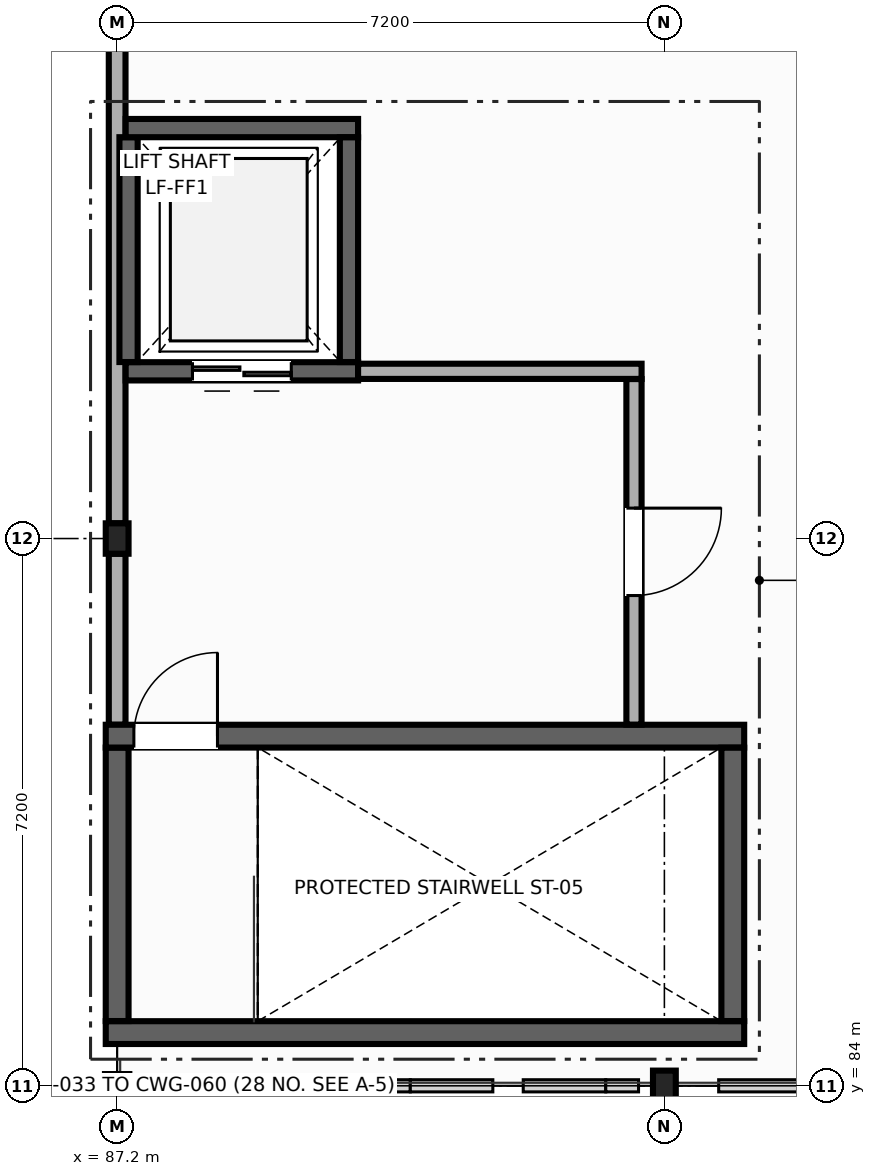
"""IFC4 building model, lengths in metres.
Left out: names, types, materials, properties, quantities, classifications, styles, units other than length and angle.
Written with IfcOpenShell. Run it as: python <this file> out.ifc"""

import sys

from ifc_helpers import new_model, si_unit, direction, frame, frame_2d, origin, origin_2d, place, context, subcontext, project, spatial, rectangle, i_section, extrude, element, fill, save


model = new_model("IFC4")
c1 = context("Model", 3, precision=1e-05, world=origin(), true_north=direction((0.0, 1.0)))
c2 = subcontext(c1, "Body", "Model", "MODEL_VIEW")
j1 = project(units=[si_unit("LENGTHUNIT", "METRE"), si_unit("PLANEANGLEUNIT", "RADIAN")], contexts=[c1])
p1 = place(None, origin())
s1 = spatial("IfcSite", under=j1, at=p1, CompositionType="ELEMENT")
p2 = place(p1, origin())
s2 = spatial("IfcBuilding", under=s1, at=p2, CompositionType="ELEMENT")
p3 = place(p2, frame((0.0, 0.0, 23.1)))
s3 = spatial("IfcBuildingStorey", under=s2, at=p3, CompositionType="ELEMENT", Elevation=23.1)
p4 = place(p3, frame((87.2, 84.0, 0.0), z_axis=(0.0, 0.0, 1.0), x_axis=(0.0, 1.0, 0.0)))
e1 = element("IfcColumn", 1, at=p4, inside=s3, PredefinedType="COLUMN", context=c2, shape_type="SweptSolid", body=[
    extrude(i_section(OverallWidth=0.309, OverallDepth=0.321, WebThickness=0.014, FlangeThickness=0.022, at=origin_2d()), origin(), (0.0, 0.0, 1.0), 4.2),
])
p5 = place(p3, frame((94.4, 84.0, 0.0), z_axis=(0.0, 0.0, 1.0), x_axis=(1.0, 0.0, 0.0)))
e2 = element("IfcColumn", 2, at=p5, inside=s3, PredefinedType="COLUMN", context=c2, shape_type="SweptSolid", body=[
    extrude(i_section(OverallWidth=0.3, OverallDepth=0.4, WebThickness=0.013, FlangeThickness=0.024, at=origin_2d()), origin(), (0.0, 0.0, 1.0), 4.524),
])
p6 = place(p3, frame((87.2, 91.2, 0.0), z_axis=(0.0, 0.0, 1.0), x_axis=(1.0, 0.0, 0.0)))
e3 = element("IfcColumn", 3, at=p6, inside=s3, PredefinedType="COLUMN", context=c2, shape_type="SweptSolid", body=[
    extrude(i_section(OverallWidth=0.3, OverallDepth=0.4, WebThickness=0.013, FlangeThickness=0.024, at=origin_2d()), origin(), (0.0, 0.0, 1.0), 4.2),
])
p7 = place(p3, frame((87.2, 88.75, 0.0), z_axis=(0.0, 0.0, 1.0), x_axis=(0.0, 1.0, 0.0)))
e4 = element("IfcWall", 4, at=p7, inside=s3, PredefinedType="SOLIDWALL", context=c2, shape_type="SweptSolid", body=[
    extrude(rectangle(XDim=2.25, YDim=0.22, at=frame_2d((1.125, 0.0))), origin(), (0.0, 0.0, 1.0), 3.535),
])
p8 = place(p3, frame((87.2, 91.4, 0.0), z_axis=(0.0, 0.0, 1.0), x_axis=(0.0, 1.0, 0.0)))
e5 = element("IfcWall", 5, at=p8, inside=s3, PredefinedType="SOLIDWALL", context=c2, shape_type="SweptSolid", body=[
    extrude(rectangle(XDim=6.85, YDim=0.22, at=frame_2d((3.425, 0.0))), origin(), (0.0, 0.0, 1.0), 4.2),
])
p9 = place(p3, frame((95.45, 84.7, 0.0), z_axis=(0.0, 0.0, 1.0), x_axis=(-1.0, 0.0, 0.0)))
e6 = element("IfcWall", 6, at=p9, inside=s3, PredefinedType="SHEAR", context=c2, shape_type="SweptSolid", body=[
    extrude(rectangle(XDim=8.4, YDim=0.3, at=frame_2d((4.2, 0.0))), origin(), (0.0, 0.0, 1.0), 3.535),
])
p10 = place(p3, frame((87.2, 84.852, 0.0), z_axis=(0.0, 0.0, 1.0), x_axis=(0.0, 1.0, 0.0)))
e7 = element("IfcWall", 7, at=p10, inside=s3, PredefinedType="SHEAR", context=c2, shape_type="SweptSolid", body=[
    extrude(rectangle(XDim=3.598, YDim=0.3, at=frame_2d((1.799, 0.0))), origin(), (0.0, 0.0, 1.0), 3.535),
])
p11 = place(p3, frame((87.05, 88.6, 0.0), z_axis=(0.0, 0.0, 1.0), x_axis=(1.0, 0.0, 0.0)))
e8 = element("IfcWall", 8, at=p11, inside=s3, PredefinedType="SHEAR", context=c2, shape_type="SweptSolid", body=[
    extrude(rectangle(XDim=8.4, YDim=0.3, at=frame_2d((4.2, 0.0))), origin(), (0.0, 0.0, 1.0), 3.535),
])
p12 = place(p11, frame((0.37, 0.0, 0.0)))
e9 = element("IfcOpeningElement", 9, at=p12, cuts=e8, PredefinedType="OPENING", context=c2, shape_type="SweptSolid", body=[
    extrude(rectangle(XDim=1.1, YDim=2.15, at=frame_2d((0.55, 1.075))), frame((0.0, 0.16, 0.0), z_axis=(0.0, -1.0, 0.0), x_axis=(1.0, 0.0, 0.0)), (0.0, 0.0, 1.0), 0.32),
])
p13 = place(p3, frame((95.3, 88.448, 0.0), z_axis=(0.0, 0.0, 1.0), x_axis=(0.0, -1.0, 0.0)))
e10 = element("IfcWall", 10, at=p13, inside=s3, PredefinedType="SHEAR", context=c2, shape_type="SweptSolid", body=[
    extrude(rectangle(XDim=3.596, YDim=0.3, at=frame_2d((1.798, 0.0))), origin(), (0.0, 0.0, 1.0), 3.88),
])
p14 = place(p3, frame((90.37, 93.4, 0.0), z_axis=(0.0, 0.0, 1.0), x_axis=(-1.0, 0.0, 0.0)))
e11 = element("IfcWall", 11, at=p14, inside=s3, PredefinedType="SHEAR", context=c2, shape_type="SweptSolid", body=[
    extrude(rectangle(XDim=3.058, YDim=0.24, at=frame_2d((1.529, 0.0))), origin(), (0.0, 0.0, 1.0), 3.88),
])
p15 = place(p14, frame((0.879, 0.0, 0.0)))
e12 = element("IfcOpeningElement", 12, at=p15, cuts=e11, PredefinedType="OPENING", context=c2, shape_type="SweptSolid", body=[
    extrude(rectangle(XDim=1.3, YDim=2.15, at=frame_2d((0.65, 1.075))), frame((0.0, 0.13, 0.0), z_axis=(0.0, -1.0, 0.0), x_axis=(1.0, 0.0, 0.0)), (0.0, 0.0, 1.0), 0.26),
])
p16 = place(p3, frame((87.35, 93.522, 0.0), z_axis=(0.0, 0.0, 1.0), x_axis=(0.0, 1.0, 0.0)))
e13 = element("IfcWall", 13, at=p16, inside=s3, PredefinedType="SHEAR", context=c2, shape_type="SweptSolid", body=[
    extrude(rectangle(XDim=2.958, YDim=0.24, at=frame_2d((1.479, 0.0))), origin(), (0.0, 0.0, 1.0), 3.88),
])
p17 = place(p3, frame((87.312, 96.6, 0.0), z_axis=(0.0, 0.0, 1.0), x_axis=(1.0, 0.0, 0.0)))
e14 = element("IfcWall", 14, at=p17, inside=s3, PredefinedType="SHEAR", context=c2, shape_type="SweptSolid", body=[
    extrude(rectangle(XDim=3.058, YDim=0.24, at=frame_2d((1.529, 0.0))), origin(), (0.0, 0.0, 1.0), 3.88),
])
p18 = place(p3, frame((90.25, 96.478, 0.0), z_axis=(0.0, 0.0, 1.0), x_axis=(0.0, -1.0, 0.0)))
e15 = element("IfcWall", 15, at=p18, inside=s3, PredefinedType="SHEAR", context=c2, shape_type="SweptSolid", body=[
    extrude(rectangle(XDim=2.956, YDim=0.24, at=frame_2d((1.478, 0.0))), origin(), (0.0, 0.0, 1.0), 3.88),
])
p19 = place(p3, frame((90.37, 93.4, 0.0), z_axis=(0.0, 0.0, 1.0), x_axis=(1.0, 0.0, 0.0)))
e16 = element("IfcWall", 16, at=p19, inside=s3, PredefinedType="PARTITIONING", context=c2, shape_type="SweptSolid", body=[
    extrude(rectangle(XDim=3.73, YDim=0.2, at=frame_2d((1.865, 0.0))), origin(), (0.0, 0.0, 1.0), 3.88),
])
p20 = place(p3, frame((94.0, 93.298, 0.0), z_axis=(0.0, 0.0, 1.0), x_axis=(0.0, -1.0, 0.0)))
e17 = element("IfcWall", 17, at=p20, inside=s3, PredefinedType="PARTITIONING", context=c2, shape_type="SweptSolid", body=[
    extrude(rectangle(XDim=4.546, YDim=0.2, at=frame_2d((2.273, 0.0))), origin(), (0.0, 0.0, 1.0), 3.88),
])
p21 = place(p20, frame((1.698, 0.0, 0.0)))
e18 = element("IfcOpeningElement", 18, at=p21, cuts=e17, PredefinedType="OPENING", context=c2, shape_type="SweptSolid", body=[
    extrude(rectangle(XDim=1.15, YDim=2.15, at=frame_2d((0.575, 1.075))), frame((0.0, 0.11, 0.0), z_axis=(0.0, -1.0, 0.0), x_axis=(1.0, 0.0, 0.0)), (0.0, 0.0, 1.0), 0.22),
])
p22 = place(p12, origin())
e19 = element("IfcDoor", 19, at=p22, inside=s3, OperationType="SINGLE_SWING_RIGHT", PredefinedType="DOOR", context=c2, shape_type="SweptSolid", body=[
    extrude(rectangle(XDim=1.1, YDim=2.15, at=frame_2d((0.55, 1.075))), frame((0.0, 0.025, 0.0), z_axis=(0.0, -1.0, 0.0), x_axis=(1.0, 0.0, 0.0)), (0.0, 0.0, 1.0), 0.05),
])
fill(e9, e19)
p23 = place(p15, origin())
e20 = element("IfcDoor", 20, at=p23, inside=s3, OperationType="DOUBLE_DOOR_SLIDING", PredefinedType="DOOR", context=c2, shape_type="SweptSolid", body=[
    extrude(rectangle(XDim=1.3, YDim=2.15, at=frame_2d((0.65, 1.075))), frame((0.0, 0.025, 0.0), z_axis=(0.0, -1.0, 0.0), x_axis=(1.0, 0.0, 0.0)), (0.0, 0.0, 1.0), 0.05),
])
fill(e12, e20)
p24 = place(p21, origin())
e21 = element("IfcDoor", 21, at=p24, inside=s3, OperationType="SINGLE_SWING_LEFT", PredefinedType="DOOR", context=c2, shape_type="SweptSolid", body=[
    extrude(rectangle(XDim=1.15, YDim=2.15, at=frame_2d((0.575, 1.075))), frame((0.0, 0.025, 0.0), z_axis=(0.0, -1.0, 0.0), x_axis=(1.0, 0.0, 0.0)), (0.0, 0.0, 1.0), 0.05),
])
fill(e18, e21)
save(model, sys.argv[1])
